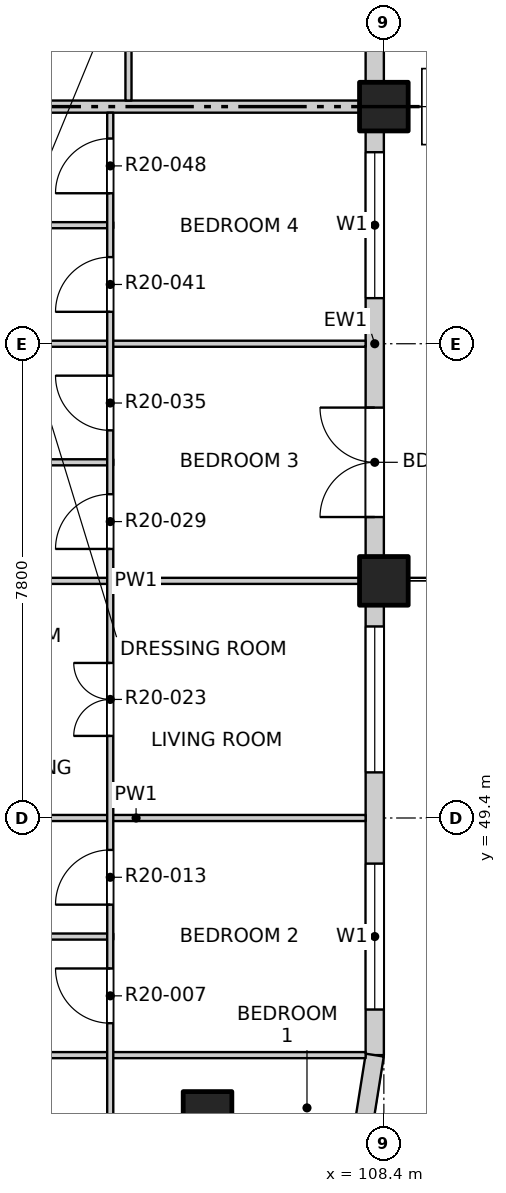
"""IFC4 building model, lengths in metres.
Left out: names, types, materials, properties, quantities, classifications, styles, units other than length and angle.
Written with IfcOpenShell. Run it as: python <this file> out.ifc"""

import sys

from ifc_helpers import new_model, si_unit, direction, frame, frame_2d, origin, origin_2d, place, context, subcontext, project, spatial, rectangle, extrude, element, fill, save


model = new_model("IFC4")
c1 = context("Model", 3, precision=1e-05, world=origin(), true_north=direction((0.0, 1.0)))
c2 = subcontext(c1, "Body", "Model", "MODEL_VIEW")
j1 = project(units=[si_unit("LENGTHUNIT", "METRE"), si_unit("PLANEANGLEUNIT", "RADIAN")], contexts=[c1])
p1 = place(None, origin())
s1 = spatial("IfcSite", under=j1, at=p1, CompositionType="ELEMENT")
p2 = place(p1, origin())
s2 = spatial("IfcBuilding", under=s1, at=p2, CompositionType="ELEMENT")
p3 = place(p2, frame((0.0, 0.0, 204.1)))
s3 = spatial("IfcBuildingStorey", under=s2, at=p3, CompositionType="ELEMENT", Elevation=204.1)
for number, where, z_axis, x_axis in (
    (1, (105.5, 44.5, -0.25), (0.0, 0.0, 1.0), (1.0, 0.0, 0.0)),
    (2, (108.4, 53.3, -0.25), (0.0, 0.0, 1.0), (1.0, 0.0, 0.0)),
    (3, (108.4, 61.1, -0.25), (0.0, 0.0, 1.0), (1.0, 0.0, 0.0)),
):
    element("IfcColumn", number, at=place(p3, frame(where, z_axis=z_axis, x_axis=x_axis)), inside=s3, PredefinedType="COLUMN", context=c2, shape_type="SweptSolid", body=[
        extrude(rectangle(XDim=0.8, YDim=0.8, at=origin_2d()), origin(), (0.0, 0.0, 1.0), 3.4),
    ])
p4 = place(p3, frame((108.25, 45.5, 0.0), z_axis=(0.0, 0.0, 1.0), x_axis=(0.0, 1.0, 0.0)))
e4 = element("IfcWall", 4, at=p4, inside=s3, PredefinedType="SOLIDWALL", context=c2, shape_type="SweptSolid", body=[
    extrude(rectangle(XDim=7.4, YDim=0.3, at=frame_2d((3.7, 0.0))), origin(), (0.0, 0.0, 1.0), 2.7),
])
p5 = place(p4, frame((0.75, 0.0, 0.9)))
e5 = element("IfcOpeningElement", 5, at=p5, cuts=e4, PredefinedType="OPENING", context=c2, shape_type="SweptSolid", body=[
    extrude(rectangle(XDim=2.4, YDim=1.8, at=frame_2d((1.2, 0.9))), frame((0.0, 0.16, 0.0), z_axis=(0.0, -1.0, 0.0), x_axis=(1.0, 0.0, 0.0)), (0.0, 0.0, 1.0), 0.32),
])
p6 = place(p4, frame((4.65, 0.0, 0.9)))
e6 = element("IfcOpeningElement", 6, at=p6, cuts=e4, PredefinedType="OPENING", context=c2, shape_type="SweptSolid", body=[
    extrude(rectangle(XDim=2.4, YDim=1.8, at=frame_2d((1.2, 0.9))), frame((0.0, 0.16, 0.0), z_axis=(0.0, -1.0, 0.0), x_axis=(1.0, 0.0, 0.0)), (0.0, 0.0, 1.0), 0.32),
])
p7 = place(p3, frame((108.25, 53.7, 0.0), z_axis=(0.0, 0.0, 1.0), x_axis=(0.0, 1.0, 0.0)))
e7 = element("IfcWall", 7, at=p7, inside=s3, PredefinedType="SOLIDWALL", context=c2, shape_type="SweptSolid", body=[
    extrude(rectangle(XDim=7.0, YDim=0.3, at=frame_2d((3.5, 0.0))), origin(), (0.0, 0.0, 1.0), 2.7),
])
p8 = place(p7, frame((0.65, 0.0, 0.0)))
e8 = element("IfcOpeningElement", 8, at=p8, cuts=e7, PredefinedType="OPENING", context=c2, shape_type="SweptSolid", body=[
    extrude(rectangle(XDim=1.8, YDim=2.4, at=frame_2d((0.9, 1.2))), frame((0.0, 0.16, 0.0), z_axis=(0.0, -1.0, 0.0), x_axis=(1.0, 0.0, 0.0)), (0.0, 0.0, 1.0), 0.32),
])
p9 = place(p7, frame((4.25, 0.0, 0.9)))
e9 = element("IfcOpeningElement", 9, at=p9, cuts=e7, PredefinedType="OPENING", context=c2, shape_type="SweptSolid", body=[
    extrude(rectangle(XDim=2.4, YDim=1.8, at=frame_2d((1.2, 0.9))), frame((0.0, 0.16, 0.0), z_axis=(0.0, -1.0, 0.0), x_axis=(1.0, 0.0, 0.0)), (0.0, 0.0, 1.0), 0.32),
])
p10 = place(p3, frame((108.25, 61.5, 0.0), z_axis=(0.0, 0.0, 1.0), x_axis=(0.0, 1.0, 0.0)))
e10 = element("IfcWall", 10, at=p10, inside=s3, PredefinedType="SOLIDWALL", context=c2, shape_type="SweptSolid", body=[
    extrude(rectangle(XDim=7.0, YDim=0.3, at=frame_2d((3.5, 0.0))), origin(), (0.0, 0.0, 1.0), 2.7),
])
p11 = place(p10, frame((0.65, 0.0, 0.0)))
e11 = element("IfcOpeningElement", 11, at=p11, cuts=e10, PredefinedType="OPENING", context=c2, shape_type="SweptSolid", body=[
    extrude(rectangle(XDim=1.8, YDim=2.4, at=frame_2d((0.9, 1.2))), frame((0.0, 0.16, 0.0), z_axis=(0.0, -1.0, 0.0), x_axis=(1.0, 0.0, 0.0)), (0.0, 0.0, 1.0), 0.32),
])
p12 = place(p10, frame((4.25, 0.0, 0.9)))
e12 = element("IfcOpeningElement", 12, at=p12, cuts=e10, PredefinedType="OPENING", context=c2, shape_type="SweptSolid", body=[
    extrude(rectangle(XDim=2.4, YDim=1.8, at=frame_2d((1.2, 0.9))), frame((0.0, 0.16, 0.0), z_axis=(0.0, -1.0, 0.0), x_axis=(1.0, 0.0, 0.0)), (0.0, 0.0, 1.0), 0.32),
])
p13 = place(p3, frame((108.066, 44.341, 0.0), z_axis=(0.0, 0.0, 1.0), x_axis=(0.156496880861, 0.987678452879, 0.0)))
e13 = element("IfcWall", 13, at=p13, inside=s3, PredefinedType="SOLIDWALL", context=c2, shape_type="SweptSolid", body=[
    extrude(rectangle(XDim=1.173, YDim=0.3, at=frame_2d((0.586, 0.0))), origin(), (0.0, 0.0, 1.0), 2.7),
])
p14 = place(p3, frame((96.625, 45.5, 0.0), z_axis=(0.0, 0.0, 1.0), x_axis=(1.0, 0.0, 0.0)))
e14 = element("IfcWall", 14, at=p14, inside=s3, PredefinedType="PARTITIONING", context=c2, shape_type="SweptSolid", body=[
    extrude(rectangle(XDim=11.475, YDim=0.1, at=frame_2d((5.738, 0.0))), origin(), (0.0, 0.0, 1.0), 3.15),
])
p15 = place(p14, frame((2.61, 0.0, 0.0)))
e15 = element("IfcOpeningElement", 15, at=p15, cuts=e14, PredefinedType="OPENING", context=c2, shape_type="SweptSolid", body=[
    extrude(rectangle(XDim=0.9, YDim=2.1, at=frame_2d((0.45, 1.05))), frame((0.0, 0.06, 0.0), z_axis=(0.0, -1.0, 0.0), x_axis=(1.0, 0.0, 0.0)), (0.0, 0.0, 1.0), 0.12),
])
p16 = place(p3, frame((100.55, 47.45, 0.0), z_axis=(0.0, 0.0, 1.0), x_axis=(1.0, 0.0, 0.0)))
e16 = element("IfcWall", 16, at=p16, inside=s3, PredefinedType="PARTITIONING", context=c2, shape_type="SweptSolid", body=[
    extrude(rectangle(XDim=3.4, YDim=0.1, at=frame_2d((1.7, 0.0))), origin(), (0.0, 0.0, 1.0), 3.15),
])
for number, where, z_axis, x_axis in (
    (17, (100.55, 49.4, 0.0), (0.0, 0.0, 1.0), (1.0, 0.0, 0.0)),
    (18, (100.55, 53.3, 0.0), (0.0, 0.0, 1.0), (1.0, 0.0, 0.0)),
):
    element("IfcWall", number, at=place(p3, frame(where, z_axis=z_axis, x_axis=x_axis)), inside=s3, PredefinedType="PARTITIONING", context=c2, shape_type="SweptSolid", body=[
        extrude(rectangle(XDim=7.55, YDim=0.1, at=frame_2d((3.775, 0.0))), origin(), (0.0, 0.0, 1.0), 3.15),
    ])
p17 = place(p3, frame((100.55, 55.25, 0.0), z_axis=(0.0, 0.0, 1.0), x_axis=(1.0, 0.0, 0.0)))
e19 = element("IfcWall", 19, at=p17, inside=s3, PredefinedType="PARTITIONING", context=c2, shape_type="SweptSolid", body=[
    extrude(rectangle(XDim=3.4, YDim=0.1, at=frame_2d((1.7, 0.0))), origin(), (0.0, 0.0, 1.0), 3.15),
])
p18 = place(p3, frame((100.55, 57.2, 0.0), z_axis=(0.0, 0.0, 1.0), x_axis=(1.0, 0.0, 0.0)))
e20 = element("IfcWall", 20, at=p18, inside=s3, PredefinedType="PARTITIONING", context=c2, shape_type="SweptSolid", body=[
    extrude(rectangle(XDim=7.55, YDim=0.1, at=frame_2d((3.775, 0.0))), origin(), (0.0, 0.0, 1.0), 3.15),
])
p19 = place(p3, frame((100.55, 59.15, 0.0), z_axis=(0.0, 0.0, 1.0), x_axis=(1.0, 0.0, 0.0)))
e21 = element("IfcWall", 21, at=p19, inside=s3, PredefinedType="PARTITIONING", context=c2, shape_type="SweptSolid", body=[
    extrude(rectangle(XDim=3.4, YDim=0.1, at=frame_2d((1.7, 0.0))), origin(), (0.0, 0.0, 1.0), 3.15),
])
p20 = place(p3, frame((96.6, 61.1, 0.0), z_axis=(0.0, 0.0, 1.0), x_axis=(1.0, 0.0, 0.0)))
e22 = element("IfcWall", 22, at=p20, inside=s3, PredefinedType="PARTITIONING", context=c2, shape_type="SweptSolid", body=[
    extrude(rectangle(XDim=11.5, YDim=0.2, at=frame_2d((5.75, 0.0))), origin(), (0.0, 0.0, 1.0), 2.55),
])
p21 = place(p3, frame((103.9, 41.9, 0.0), z_axis=(0.0, 0.0, 1.0), x_axis=(0.0, 1.0, 0.0)))
e23 = element("IfcWall", 23, at=p21, inside=s3, PredefinedType="PARTITIONING", context=c2, shape_type="SweptSolid", body=[
    extrude(rectangle(XDim=19.1, YDim=0.1, at=frame_2d((9.55, 0.0))), origin(), (0.0, 0.0, 1.0), 3.15),
])
p22 = place(p21, frame((1.05, 0.0, 0.0)))
e24 = element("IfcOpeningElement", 24, at=p22, cuts=e23, PredefinedType="OPENING", context=c2, shape_type="SweptSolid", body=[
    extrude(rectangle(XDim=1.2, YDim=2.1, at=frame_2d((0.6, 1.05))), frame((0.0, 0.06, 0.0), z_axis=(0.0, -1.0, 0.0), x_axis=(1.0, 0.0, 0.0)), (0.0, 0.0, 1.0), 0.12),
])
p23 = place(p21, frame((4.125, 0.0, 0.0)))
e25 = element("IfcOpeningElement", 25, at=p23, cuts=e23, PredefinedType="OPENING", context=c2, shape_type="SweptSolid", body=[
    extrude(rectangle(XDim=0.9, YDim=2.1, at=frame_2d((0.45, 1.05))), frame((0.0, 0.06, 0.0), z_axis=(0.0, -1.0, 0.0), x_axis=(1.0, 0.0, 0.0)), (0.0, 0.0, 1.0), 0.12),
])
p24 = place(p21, frame((6.075, 0.0, 0.0)))
e26 = element("IfcOpeningElement", 26, at=p24, cuts=e23, PredefinedType="OPENING", context=c2, shape_type="SweptSolid", body=[
    extrude(rectangle(XDim=0.9, YDim=2.1, at=frame_2d((0.45, 1.05))), frame((0.0, 0.06, 0.0), z_axis=(0.0, -1.0, 0.0), x_axis=(1.0, 0.0, 0.0)), (0.0, 0.0, 1.0), 0.12),
])
p25 = place(p21, frame((8.85, 0.0, 0.0)))
e27 = element("IfcOpeningElement", 27, at=p25, cuts=e23, PredefinedType="OPENING", context=c2, shape_type="SweptSolid", body=[
    extrude(rectangle(XDim=1.2, YDim=2.1, at=frame_2d((0.6, 1.05))), frame((0.0, 0.06, 0.0), z_axis=(0.0, -1.0, 0.0), x_axis=(1.0, 0.0, 0.0)), (0.0, 0.0, 1.0), 0.12),
])
p26 = place(p21, frame((11.925, 0.0, 0.0)))
e28 = element("IfcOpeningElement", 28, at=p26, cuts=e23, PredefinedType="OPENING", context=c2, shape_type="SweptSolid", body=[
    extrude(rectangle(XDim=0.9, YDim=2.1, at=frame_2d((0.45, 1.05))), frame((0.0, 0.06, 0.0), z_axis=(0.0, -1.0, 0.0), x_axis=(1.0, 0.0, 0.0)), (0.0, 0.0, 1.0), 0.12),
])
p27 = place(p21, frame((13.875, 0.0, 0.0)))
e29 = element("IfcOpeningElement", 29, at=p27, cuts=e23, PredefinedType="OPENING", context=c2, shape_type="SweptSolid", body=[
    extrude(rectangle(XDim=0.9, YDim=2.1, at=frame_2d((0.45, 1.05))), frame((0.0, 0.06, 0.0), z_axis=(0.0, -1.0, 0.0), x_axis=(1.0, 0.0, 0.0)), (0.0, 0.0, 1.0), 0.12),
])
p28 = place(p21, frame((15.825, 0.0, 0.0)))
e30 = element("IfcOpeningElement", 30, at=p28, cuts=e23, PredefinedType="OPENING", context=c2, shape_type="SweptSolid", body=[
    extrude(rectangle(XDim=0.9, YDim=2.1, at=frame_2d((0.45, 1.05))), frame((0.0, 0.06, 0.0), z_axis=(0.0, -1.0, 0.0), x_axis=(1.0, 0.0, 0.0)), (0.0, 0.0, 1.0), 0.12),
])
p29 = place(p21, frame((17.775, 0.0, 0.0)))
e31 = element("IfcOpeningElement", 31, at=p29, cuts=e23, PredefinedType="OPENING", context=c2, shape_type="SweptSolid", body=[
    extrude(rectangle(XDim=0.9, YDim=2.1, at=frame_2d((0.45, 1.05))), frame((0.0, 0.06, 0.0), z_axis=(0.0, -1.0, 0.0), x_axis=(1.0, 0.0, 0.0)), (0.0, 0.0, 1.0), 0.12),
])
p30 = place(p3, frame((104.2, 61.2, 0.0), z_axis=(0.0, 0.0, 1.0), x_axis=(0.0, 1.0, 0.0)))
e32 = element("IfcWall", 32, at=p30, inside=s3, PredefinedType="PARTITIONING", context=c2, shape_type="SweptSolid", body=[
    extrude(rectangle(XDim=26.9, YDim=0.1, at=frame_2d((13.45, 0.0))), origin(), (0.0, 0.0, 1.0), 3.15),
])
p31 = place(p30, frame((1.25, 0.0, 0.0)))
e33 = element("IfcOpeningElement", 33, at=p31, cuts=e32, PredefinedType="OPENING", context=c2, shape_type="SweptSolid", body=[
    extrude(rectangle(XDim=1.2, YDim=2.1, at=frame_2d((0.6, 1.05))), frame((0.0, 0.06, 0.0), z_axis=(0.0, -1.0, 0.0), x_axis=(1.0, 0.0, 0.0)), (0.0, 0.0, 1.0), 0.12),
])
p32 = place(p30, frame((5.15, 0.0, 0.0)))
e34 = element("IfcOpeningElement", 34, at=p32, cuts=e32, PredefinedType="OPENING", context=c2, shape_type="SweptSolid", body=[
    extrude(rectangle(XDim=1.2, YDim=2.1, at=frame_2d((0.6, 1.05))), frame((0.0, 0.06, 0.0), z_axis=(0.0, -1.0, 0.0), x_axis=(1.0, 0.0, 0.0)), (0.0, 0.0, 1.0), 0.12),
])
p33 = place(p30, frame((8.225, 0.0, 0.0)))
e35 = element("IfcOpeningElement", 35, at=p33, cuts=e32, PredefinedType="OPENING", context=c2, shape_type="SweptSolid", body=[
    extrude(rectangle(XDim=0.9, YDim=2.1, at=frame_2d((0.45, 1.05))), frame((0.0, 0.06, 0.0), z_axis=(0.0, -1.0, 0.0), x_axis=(1.0, 0.0, 0.0)), (0.0, 0.0, 1.0), 0.12),
])
p34 = place(p30, frame((10.175, 0.0, 0.0)))
e36 = element("IfcOpeningElement", 36, at=p34, cuts=e32, PredefinedType="OPENING", context=c2, shape_type="SweptSolid", body=[
    extrude(rectangle(XDim=0.9, YDim=2.1, at=frame_2d((0.45, 1.05))), frame((0.0, 0.06, 0.0), z_axis=(0.0, -1.0, 0.0), x_axis=(1.0, 0.0, 0.0)), (0.0, 0.0, 1.0), 0.12),
])
p35 = place(p30, frame((12.125, 0.0, 0.0)))
e37 = element("IfcOpeningElement", 37, at=p35, cuts=e32, PredefinedType="OPENING", context=c2, shape_type="SweptSolid", body=[
    extrude(rectangle(XDim=0.9, YDim=2.1, at=frame_2d((0.45, 1.05))), frame((0.0, 0.06, 0.0), z_axis=(0.0, -1.0, 0.0), x_axis=(1.0, 0.0, 0.0)), (0.0, 0.0, 1.0), 0.12),
])
p36 = place(p30, frame((14.075, 0.0, 0.0)))
e38 = element("IfcOpeningElement", 38, at=p36, cuts=e32, PredefinedType="OPENING", context=c2, shape_type="SweptSolid", body=[
    extrude(rectangle(XDim=0.9, YDim=2.1, at=frame_2d((0.45, 1.05))), frame((0.0, 0.06, 0.0), z_axis=(0.0, -1.0, 0.0), x_axis=(1.0, 0.0, 0.0)), (0.0, 0.0, 1.0), 0.12),
])
p37 = place(p30, frame((16.85, 0.0, 0.0)))
e39 = element("IfcOpeningElement", 39, at=p37, cuts=e32, PredefinedType="OPENING", context=c2, shape_type="SweptSolid", body=[
    extrude(rectangle(XDim=1.2, YDim=2.1, at=frame_2d((0.6, 1.05))), frame((0.0, 0.06, 0.0), z_axis=(0.0, -1.0, 0.0), x_axis=(1.0, 0.0, 0.0)), (0.0, 0.0, 1.0), 0.12),
])
p38 = place(p30, frame((19.925, 0.0, 0.0)))
e40 = element("IfcOpeningElement", 40, at=p38, cuts=e32, PredefinedType="OPENING", context=c2, shape_type="SweptSolid", body=[
    extrude(rectangle(XDim=0.9, YDim=2.1, at=frame_2d((0.45, 1.05))), frame((0.0, 0.06, 0.0), z_axis=(0.0, -1.0, 0.0), x_axis=(1.0, 0.0, 0.0)), (0.0, 0.0, 1.0), 0.12),
])
p39 = place(p30, frame((21.875, 0.0, 0.0)))
e41 = element("IfcOpeningElement", 41, at=p39, cuts=e32, PredefinedType="OPENING", context=c2, shape_type="SweptSolid", body=[
    extrude(rectangle(XDim=0.9, YDim=2.1, at=frame_2d((0.45, 1.05))), frame((0.0, 0.06, 0.0), z_axis=(0.0, -1.0, 0.0), x_axis=(1.0, 0.0, 0.0)), (0.0, 0.0, 1.0), 0.12),
])
p40 = place(p30, frame((24.65, 0.0, 0.0)))
e42 = element("IfcOpeningElement", 42, at=p40, cuts=e32, PredefinedType="OPENING", context=c2, shape_type="SweptSolid", body=[
    extrude(rectangle(XDim=1.2, YDim=2.1, at=frame_2d((0.6, 1.05))), frame((0.0, 0.06, 0.0), z_axis=(0.0, -1.0, 0.0), x_axis=(1.0, 0.0, 0.0)), (0.0, 0.0, 1.0), 0.12),
])
p41 = place(p5, origin())
e43 = element("IfcWindow", 43, at=p41, inside=s3, PartitioningType="DOUBLE_PANEL_VERTICAL", PredefinedType="WINDOW", context=c2, shape_type="SweptSolid", body=[
    extrude(rectangle(XDim=2.4, YDim=1.8, at=frame_2d((1.2, 0.9))), frame((0.0, 0.03, 0.0), z_axis=(0.0, -1.0, 0.0), x_axis=(1.0, 0.0, 0.0)), (0.0, 0.0, 1.0), 0.06),
])
fill(e5, e43)
p42 = place(p6, origin())
e44 = element("IfcWindow", 44, at=p42, inside=s3, PartitioningType="DOUBLE_PANEL_VERTICAL", PredefinedType="WINDOW", context=c2, shape_type="SweptSolid", body=[
    extrude(rectangle(XDim=2.4, YDim=1.8, at=frame_2d((1.2, 0.9))), frame((0.0, 0.03, 0.0), z_axis=(0.0, -1.0, 0.0), x_axis=(1.0, 0.0, 0.0)), (0.0, 0.0, 1.0), 0.06),
])
fill(e6, e44)
p43 = place(p8, origin())
e45 = element("IfcDoor", 45, at=p43, inside=s3, OperationType="DOUBLE_DOOR_SINGLE_SWING", PredefinedType="DOOR", context=c2, shape_type="SweptSolid", body=[
    extrude(rectangle(XDim=1.8, YDim=2.4, at=frame_2d((0.9, 1.2))), frame((0.0, 0.025, 0.0), z_axis=(0.0, -1.0, 0.0), x_axis=(1.0, 0.0, 0.0)), (0.0, 0.0, 1.0), 0.05),
])
fill(e8, e45)
p44 = place(p9, origin())
e46 = element("IfcWindow", 46, at=p44, inside=s3, PartitioningType="DOUBLE_PANEL_VERTICAL", PredefinedType="WINDOW", context=c2, shape_type="SweptSolid", body=[
    extrude(rectangle(XDim=2.4, YDim=1.8, at=frame_2d((1.2, 0.9))), frame((0.0, 0.03, 0.0), z_axis=(0.0, -1.0, 0.0), x_axis=(1.0, 0.0, 0.0)), (0.0, 0.0, 1.0), 0.06),
])
fill(e9, e46)
p45 = place(p23, origin())
e47 = element("IfcDoor", 47, at=p45, inside=s3, OperationType="SINGLE_SWING_RIGHT", PredefinedType="DOOR", context=c2, shape_type="SweptSolid", body=[
    extrude(rectangle(XDim=0.9, YDim=2.1, at=frame_2d((0.45, 1.05))), frame((0.0, 0.025, 0.0), z_axis=(0.0, -1.0, 0.0), x_axis=(1.0, 0.0, 0.0)), (0.0, 0.0, 1.0), 0.05),
])
fill(e25, e47)
p46 = place(p24, origin())
e48 = element("IfcDoor", 48, at=p46, inside=s3, OperationType="SINGLE_SWING_LEFT", PredefinedType="DOOR", context=c2, shape_type="SweptSolid", body=[
    extrude(rectangle(XDim=0.9, YDim=2.1, at=frame_2d((0.45, 1.05))), frame((0.0, 0.025, 0.0), z_axis=(0.0, -1.0, 0.0), x_axis=(1.0, 0.0, 0.0)), (0.0, 0.0, 1.0), 0.05),
])
fill(e26, e48)
p47 = place(p25, origin())
e49 = element("IfcDoor", 49, at=p47, inside=s3, OperationType="DOUBLE_DOOR_SINGLE_SWING", PredefinedType="DOOR", context=c2, shape_type="SweptSolid", body=[
    extrude(rectangle(XDim=1.2, YDim=2.1, at=frame_2d((0.6, 1.05))), frame((0.0, 0.025, 0.0), z_axis=(0.0, -1.0, 0.0), x_axis=(1.0, 0.0, 0.0)), (0.0, 0.0, 1.0), 0.05),
])
fill(e27, e49)
p48 = place(p26, origin())
e50 = element("IfcDoor", 50, at=p48, inside=s3, OperationType="SINGLE_SWING_LEFT", PredefinedType="DOOR", context=c2, shape_type="SweptSolid", body=[
    extrude(rectangle(XDim=0.9, YDim=2.1, at=frame_2d((0.45, 1.05))), frame((0.0, 0.025, 0.0), z_axis=(0.0, -1.0, 0.0), x_axis=(1.0, 0.0, 0.0)), (0.0, 0.0, 1.0), 0.05),
])
fill(e28, e50)
p49 = place(p27, origin())
e51 = element("IfcDoor", 51, at=p49, inside=s3, OperationType="SINGLE_SWING_RIGHT", PredefinedType="DOOR", context=c2, shape_type="SweptSolid", body=[
    extrude(rectangle(XDim=0.9, YDim=2.1, at=frame_2d((0.45, 1.05))), frame((0.0, 0.025, 0.0), z_axis=(0.0, -1.0, 0.0), x_axis=(1.0, 0.0, 0.0)), (0.0, 0.0, 1.0), 0.05),
])
fill(e29, e51)
p50 = place(p28, origin())
e52 = element("IfcDoor", 52, at=p50, inside=s3, OperationType="SINGLE_SWING_LEFT", PredefinedType="DOOR", context=c2, shape_type="SweptSolid", body=[
    extrude(rectangle(XDim=0.9, YDim=2.1, at=frame_2d((0.45, 1.05))), frame((0.0, 0.025, 0.0), z_axis=(0.0, -1.0, 0.0), x_axis=(1.0, 0.0, 0.0)), (0.0, 0.0, 1.0), 0.05),
])
fill(e30, e52)
p51 = place(p29, origin())
e53 = element("IfcDoor", 53, at=p51, inside=s3, OperationType="SINGLE_SWING_LEFT", PredefinedType="DOOR", context=c2, shape_type="SweptSolid", body=[
    extrude(rectangle(XDim=0.9, YDim=2.1, at=frame_2d((0.45, 1.05))), frame((0.0, 0.025, 0.0), z_axis=(0.0, -1.0, 0.0), x_axis=(1.0, 0.0, 0.0)), (0.0, 0.0, 1.0), 0.05),
])
fill(e31, e53)
save(model, sys.argv[1])
